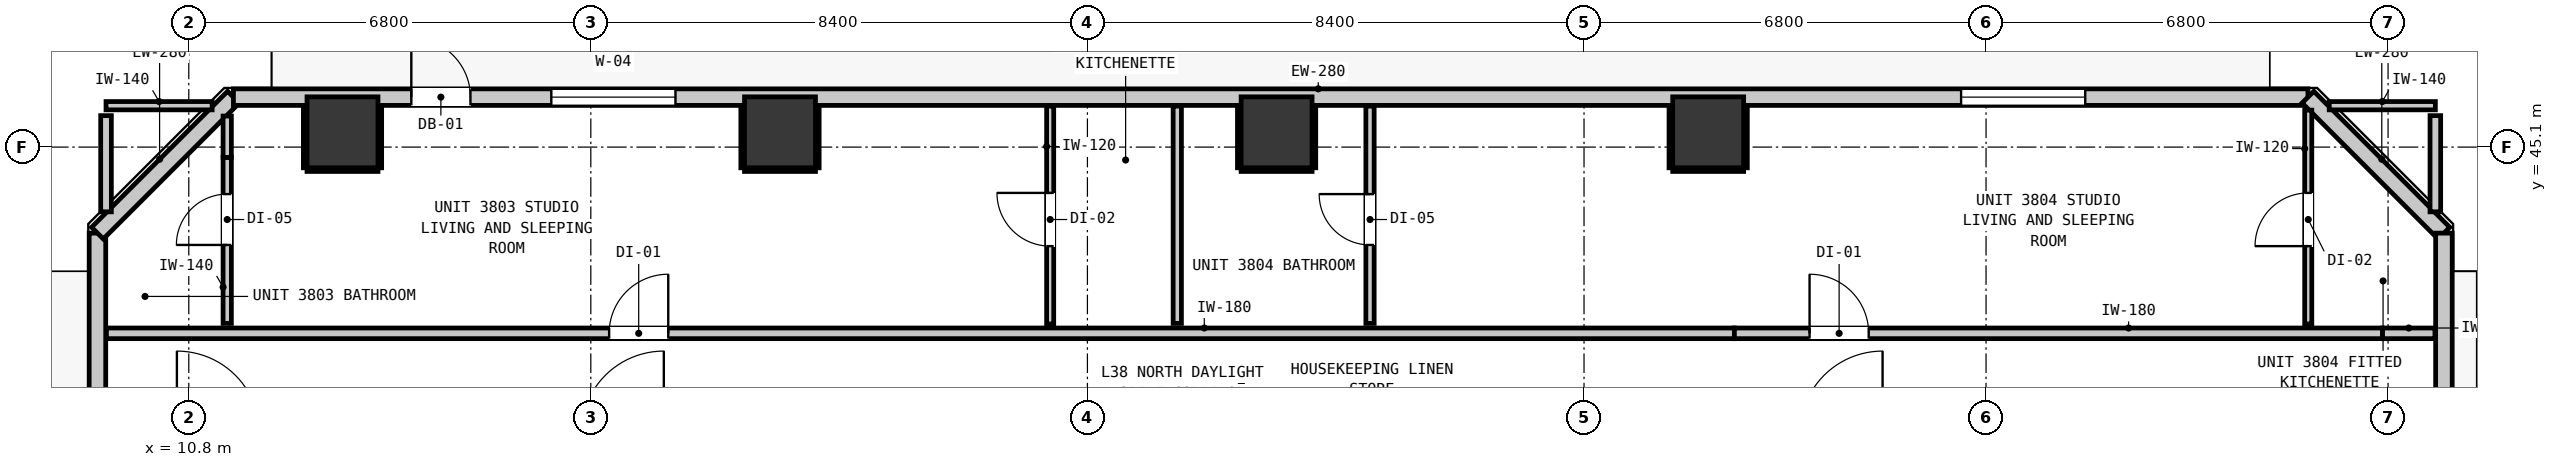
"""IFC4 building model, lengths in metres.
Left out: names, types, materials, properties, quantities, classifications, styles, units other than length and angle.
Written with IfcOpenShell. Run it as: python <this file> out.ifc"""

import sys

from ifc_helpers import new_model, si_unit, direction, frame, frame_2d, origin, origin_2d, place, context, subcontext, project, spatial, rectangle, extrude, element, fill, save


model = new_model("IFC4")
c1 = context("Model", 3, precision=1e-05, world=origin(), true_north=direction((0.0, 1.0)))
c2 = subcontext(c1, "Body", "Model", "MODEL_VIEW")
j1 = project(units=[si_unit("LENGTHUNIT", "METRE"), si_unit("PLANEANGLEUNIT", "RADIAN")], contexts=[c1])
p1 = place(None, origin())
s1 = spatial("IfcSite", under=j1, at=p1, CompositionType="ELEMENT")
p2 = place(p1, origin())
s2 = spatial("IfcBuilding", under=s1, at=p2, CompositionType="ELEMENT")
p3 = place(p2, frame((0.0, 0.0, 132.64)))
s3 = spatial("IfcBuildingStorey", under=s2, at=p3, CompositionType="ELEMENT", Elevation=132.64)
for number, where, z_axis, x_axis in (
    (1, (13.4, 45.35, 0.0), (0.0, 0.0, 1.0), (1.0, 0.0, 0.0)),
    (2, (20.8, 45.35, 0.0), (0.0, 0.0, 1.0), (1.0, 0.0, 0.0)),
    (3, (29.2, 45.35, 0.0), (0.0, 0.0, 1.0), (1.0, 0.0, 0.0)),
    (4, (36.5, 45.35, 0.0), (0.0, 0.0, 1.0), (1.0, 0.0, 0.0)),
):
    element("IfcColumn", number, at=place(p3, frame(where, z_axis=z_axis, x_axis=x_axis)), inside=s3, PredefinedType="COLUMN", context=c2, shape_type="SweptSolid", body=[
        extrude(rectangle(XDim=1.2, YDim=1.2, at=origin_2d()), origin(), (0.0, 0.0, 1.0), 3.32),
    ])
p4 = place(p3, frame((9.255, 11.355, 0.0), z_axis=(0.0, 0.0, 1.0), x_axis=(0.0, 1.0, 0.0)))
e5 = element("IfcWall", 5, at=p4, inside=s3, PredefinedType="STANDARD", context=c2, shape_type="SweptSolid", body=[
    extrude(rectangle(XDim=32.29, YDim=0.28, at=frame_2d((16.145, 0.0))), origin(), (0.0, 0.0, 1.0), 3.08),
])
p5 = place(p4, frame((5.818, 0.0, 0.0)))
e6 = element("IfcOpeningElement", 6, at=p5, cuts=e5, PredefinedType="OPENING", context=c2, shape_type="SweptSolid", body=[
    extrude(rectangle(XDim=1.0, YDim=2.15, at=frame_2d((0.5, 1.075))), frame((0.0, 0.15, 0.0), z_axis=(0.0, -1.0, 0.0), x_axis=(1.0, 0.0, 0.0)), (0.0, 0.0, 1.0), 0.3),
])
p6 = place(p4, frame((0.544, 0.0, 0.85)))
e7 = element("IfcOpeningElement", 7, at=p6, cuts=e5, PredefinedType="OPENING", context=c2, shape_type="SweptSolid", body=[
    extrude(rectangle(XDim=1.05, YDim=1.65, at=frame_2d((0.525, 0.825))), frame((0.0, 0.15, 0.0), z_axis=(0.0, -1.0, 0.0), x_axis=(1.0, 0.0, 0.0)), (0.0, 0.0, 1.0), 0.3),
])
p7 = place(p3, frame((9.255, 43.645, 0.0), z_axis=(0.0, 0.0, 1.0), x_axis=(0.707106781187, 0.707106781187, 0.0)))
e8 = element("IfcWall", 8, at=p7, inside=s3, PredefinedType="STANDARD", context=c2, shape_type="SweptSolid", body=[
    extrude(rectangle(XDim=3.253, YDim=0.28, at=frame_2d((1.626, 0.0))), origin(), (0.0, 0.0, 1.0), 3.08),
])
p8 = place(p3, frame((11.555, 45.945, 0.0), z_axis=(0.0, 0.0, 1.0), x_axis=(1.0, 0.0, 0.0)))
e9 = element("IfcWall", 9, at=p8, inside=s3, PredefinedType="STANDARD", context=c2, shape_type="SweptSolid", body=[
    extrude(rectangle(XDim=35.09, YDim=0.28, at=frame_2d((17.545, 0.0))), origin(), (0.0, 0.0, 1.0), 3.08),
])
p9 = place(p8, frame((3.009, 0.0, 0.0)))
e10 = element("IfcOpeningElement", 10, at=p9, cuts=e9, PredefinedType="OPENING", context=c2, shape_type="SweptSolid", body=[
    extrude(rectangle(XDim=1.0, YDim=2.15, at=frame_2d((0.5, 1.075))), frame((0.0, 0.15, 0.0), z_axis=(0.0, -1.0, 0.0), x_axis=(1.0, 0.0, 0.0)), (0.0, 0.0, 1.0), 0.3),
])
p10 = place(p8, frame((5.377, 0.0, 0.85)))
e11 = element("IfcOpeningElement", 11, at=p10, cuts=e9, PredefinedType="OPENING", context=c2, shape_type="SweptSolid", body=[
    extrude(rectangle(XDim=2.1, YDim=1.9, at=frame_2d((1.05, 0.95))), frame((0.0, 0.15, 0.0), z_axis=(0.0, -1.0, 0.0), x_axis=(1.0, 0.0, 0.0)), (0.0, 0.0, 1.0), 0.3),
])
p11 = place(p8, frame((29.223, 0.0, 0.85)))
e12 = element("IfcOpeningElement", 12, at=p11, cuts=e9, PredefinedType="OPENING", context=c2, shape_type="SweptSolid", body=[
    extrude(rectangle(XDim=2.1, YDim=1.9, at=frame_2d((1.05, 0.95))), frame((0.0, 0.15, 0.0), z_axis=(0.0, -1.0, 0.0), x_axis=(1.0, 0.0, 0.0)), (0.0, 0.0, 1.0), 0.3),
])
p12 = place(p3, frame((46.645, 45.945, 0.0), z_axis=(0.0, 0.0, 1.0), x_axis=(0.707106781187, -0.707106781187, 0.0)))
e13 = element("IfcWall", 13, at=p12, inside=s3, PredefinedType="STANDARD", context=c2, shape_type="SweptSolid", body=[
    extrude(rectangle(XDim=3.253, YDim=0.28, at=frame_2d((1.626, 0.0))), origin(), (0.0, 0.0, 1.0), 3.08),
])
p13 = place(p3, frame((48.945, 43.645, 0.0), z_axis=(0.0, 0.0, 1.0), x_axis=(0.0, -1.0, 0.0)))
e14 = element("IfcWall", 14, at=p13, inside=s3, PredefinedType="STANDARD", context=c2, shape_type="SweptSolid", body=[
    extrude(rectangle(XDim=32.29, YDim=0.28, at=frame_2d((16.145, 0.0))), origin(), (0.0, 0.0, 1.0), 3.08),
])
p14 = place(p13, frame((5.467, 0.0, 0.0)))
e15 = element("IfcOpeningElement", 15, at=p14, cuts=e14, PredefinedType="OPENING", context=c2, shape_type="SweptSolid", body=[
    extrude(rectangle(XDim=1.0, YDim=2.15, at=frame_2d((0.5, 1.075))), frame((0.0, 0.15, 0.0), z_axis=(0.0, -1.0, 0.0), x_axis=(1.0, 0.0, 0.0)), (0.0, 0.0, 1.0), 0.3),
])
p15 = place(p13, frame((30.696, 0.0, 0.85)))
e16 = element("IfcOpeningElement", 16, at=p15, cuts=e14, PredefinedType="OPENING", context=c2, shape_type="SweptSolid", body=[
    extrude(rectangle(XDim=1.05, YDim=1.65, at=frame_2d((0.525, 0.825))), frame((0.0, 0.15, 0.0), z_axis=(0.0, -1.0, 0.0), x_axis=(1.0, 0.0, 0.0)), (0.0, 0.0, 1.0), 0.3),
])
p16 = place(p13, frame((14.611, 0.0, 0.85)))
e17 = element("IfcOpeningElement", 17, at=p16, cuts=e14, PredefinedType="OPENING", context=c2, shape_type="SweptSolid", body=[
    extrude(rectangle(XDim=2.1, YDim=1.9, at=frame_2d((1.05, 0.95))), frame((0.0, 0.15, 0.0), z_axis=(0.0, -1.0, 0.0), x_axis=(1.0, 0.0, 0.0)), (0.0, 0.0, 1.0), 0.3),
])
p17 = place(p13, frame((7.106, 0.0, 0.85)))
e18 = element("IfcOpeningElement", 18, at=p17, cuts=e14, PredefinedType="OPENING", context=c2, shape_type="SweptSolid", body=[
    extrude(rectangle(XDim=1.05, YDim=1.65, at=frame_2d((0.525, 0.825))), frame((0.0, 0.15, 0.0), z_axis=(0.0, -1.0, 0.0), x_axis=(1.0, 0.0, 0.0)), (0.0, 0.0, 1.0), 0.3),
])
p18 = place(p3, frame((9.407, 41.95, 0.0), z_axis=(0.0, 0.0, 1.0), x_axis=(1.0, 0.0, 0.0)))
e19 = element("IfcWall", 19, at=p18, inside=s3, PredefinedType="PARTITIONING", context=c2, shape_type="SweptSolid", body=[
    extrude(rectangle(XDim=27.536, YDim=0.18, at=frame_2d((13.768, 0.0))), origin(), (0.0, 0.0, 1.0), 3.08),
])
p19 = place(p18, frame((8.503, 0.0, 0.0)))
e20 = element("IfcOpeningElement", 20, at=p19, cuts=e19, PredefinedType="OPENING", context=c2, shape_type="SweptSolid", body=[
    extrude(rectangle(XDim=1.0, YDim=2.15, at=frame_2d((0.5, 1.075))), frame((0.0, 0.1, 0.0), z_axis=(0.0, -1.0, 0.0), x_axis=(1.0, 0.0, 0.0)), (0.0, 0.0, 1.0), 0.2),
])
p20 = place(p3, frame((36.943, 41.95, 0.0), z_axis=(0.0, 0.0, 1.0), x_axis=(1.0, 0.0, 0.0)))
e21 = element("IfcWall", 21, at=p20, inside=s3, PredefinedType="PARTITIONING", context=c2, shape_type="SweptSolid", body=[
    extrude(rectangle(XDim=10.964, YDim=0.18, at=frame_2d((5.482, 0.0))), origin(), (0.0, 0.0, 1.0), 2.565),
])
p21 = place(p20, frame((1.272, 0.0, 0.0)))
e22 = element("IfcOpeningElement", 22, at=p21, cuts=e21, PredefinedType="OPENING", context=c2, shape_type="SweptSolid", body=[
    extrude(rectangle(XDim=1.0, YDim=2.15, at=frame_2d((0.5, 1.075))), frame((0.0, 0.1, 0.0), z_axis=(0.0, -1.0, 0.0), x_axis=(1.0, 0.0, 0.0)), (0.0, 0.0, 1.0), 0.2),
])
p22 = place(p3, frame((47.907, 41.95, 0.0), z_axis=(0.0, 0.0, 1.0), x_axis=(1.0, 0.0, 0.0)))
e23 = element("IfcWall", 23, at=p22, inside=s3, PredefinedType="PARTITIONING", context=c2, shape_type="SweptSolid", body=[
    extrude(rectangle(XDim=0.886, YDim=0.18, at=frame_2d((0.443, 0.0))), origin(), (0.0, 0.0, 1.0), 3.08),
])
for number, where, z_axis, x_axis in (
    (24, (9.4, 45.8, 0.0), (0.0, 0.0, 1.0), (1.0, 0.0, 0.0)),
    (25, (47.005, 45.8, 0.0), (0.0, 0.0, 1.0), (1.0, 0.0, 0.0)),
):
    element("IfcWall", number, at=place(p3, frame(where, z_axis=z_axis, x_axis=x_axis)), inside=s3, PredefinedType="PARTITIONING", context=c2, shape_type="SweptSolid", body=[
        extrude(rectangle(XDim=1.795, YDim=0.14, at=frame_2d((0.897, 0.0))), origin(), (0.0, 0.0, 1.0), 3.08),
    ])
for number, where, z_axis, x_axis in (
    (26, (9.4, 44.005, 0.0), (0.0, 0.0, 1.0), (0.0, 1.0, 0.0)),
    (27, (48.8, 44.005, 0.0), (0.0, 0.0, 1.0), (0.0, 1.0, 0.0)),
):
    element("IfcWall", number, at=place(p3, frame(where, z_axis=z_axis, x_axis=x_axis)), inside=s3, PredefinedType="PARTITIONING", context=c2, shape_type="SweptSolid", body=[
        extrude(rectangle(XDim=1.627, YDim=0.18, at=frame_2d((0.813, 0.0))), origin(), (0.0, 0.0, 1.0), 3.08),
    ])
p23 = place(p3, frame((11.45, 42.118, 0.0), z_axis=(0.0, 0.0, 1.0), x_axis=(0.0, 1.0, 0.0)))
e28 = element("IfcWall", 28, at=p23, inside=s3, PredefinedType="PARTITIONING", context=c2, shape_type="SweptSolid", body=[
    extrude(rectangle(XDim=2.808, YDim=0.14, at=frame_2d((1.404, 0.0))), origin(), (0.0, 0.0, 1.0), 2.565),
])
p24 = place(p23, frame((1.327, 0.0, 0.0)))
e29 = element("IfcOpeningElement", 29, at=p24, cuts=e28, PredefinedType="OPENING", context=c2, shape_type="SweptSolid", body=[
    extrude(rectangle(XDim=0.86, YDim=2.02, at=frame_2d((0.43, 1.01))), frame((0.0, 0.08, 0.0), z_axis=(0.0, -1.0, 0.0), x_axis=(1.0, 0.0, 0.0)), (0.0, 0.0, 1.0), 0.16),
])
p25 = place(p3, frame((11.45, 44.926, 0.0), z_axis=(0.0, 0.0, 1.0), x_axis=(0.0, 1.0, 0.0)))
e30 = element("IfcWall", 30, at=p25, inside=s3, PredefinedType="PARTITIONING", context=c2, shape_type="SweptSolid", body=[
    extrude(rectangle(XDim=0.699, YDim=0.14, at=frame_2d((0.35, 0.0))), origin(), (0.0, 0.0, 1.0), 3.08),
])
p26 = place(p3, frame((27.52, 42.118, 0.0), z_axis=(0.0, 0.0, 1.0), x_axis=(0.0, 1.0, 0.0)))
e31 = element("IfcWall", 31, at=p26, inside=s3, PredefinedType="PARTITIONING", context=c2, shape_type="SweptSolid", body=[
    extrude(rectangle(XDim=3.675, YDim=0.14, at=frame_2d((1.837, 0.0))), origin(), (0.0, 0.0, 1.0), 3.08),
])
p27 = place(p3, frame((30.78, 42.118, 0.0), z_axis=(0.0, 0.0, 1.0), x_axis=(0.0, 1.0, 0.0)))
e32 = element("IfcWall", 32, at=p27, inside=s3, PredefinedType="PARTITIONING", context=c2, shape_type="SweptSolid", body=[
    extrude(rectangle(XDim=3.675, YDim=0.14, at=frame_2d((1.837, 0.0))), origin(), (0.0, 0.0, 1.0), 3.08),
])
p28 = place(p27, frame((1.327, 0.0, 0.0)))
e33 = element("IfcOpeningElement", 33, at=p28, cuts=e32, PredefinedType="OPENING", context=c2, shape_type="SweptSolid", body=[
    extrude(rectangle(XDim=0.86, YDim=2.02, at=frame_2d((0.43, 1.01))), frame((0.0, 0.08, 0.0), z_axis=(0.0, -1.0, 0.0), x_axis=(1.0, 0.0, 0.0)), (0.0, 0.0, 1.0), 0.16),
])
p29 = place(p3, frame((25.37, 42.108, 0.0), z_axis=(0.0, 0.0, 1.0), x_axis=(0.0, 1.0, 0.0)))
e34 = element("IfcWall", 34, at=p29, inside=s3, PredefinedType="PARTITIONING", context=c2, shape_type="SweptSolid", body=[
    extrude(rectangle(XDim=3.685, YDim=0.12, at=frame_2d((1.843, 0.0))), origin(), (0.0, 0.0, 1.0), 3.08),
])
p30 = place(p29, frame((1.317, 0.0, 0.0)))
e35 = element("IfcOpeningElement", 35, at=p30, cuts=e34, PredefinedType="OPENING", context=c2, shape_type="SweptSolid", body=[
    extrude(rectangle(XDim=0.9, YDim=2.1, at=frame_2d((0.45, 1.05))), frame((0.0, 0.07, 0.0), z_axis=(0.0, -1.0, 0.0), x_axis=(1.0, 0.0, 0.0)), (0.0, 0.0, 1.0), 0.14),
])
p31 = place(p3, frame((46.65, 42.108, 0.0), z_axis=(0.0, 0.0, 1.0), x_axis=(0.0, 1.0, 0.0)))
e36 = element("IfcWall", 36, at=p31, inside=s3, PredefinedType="PARTITIONING", context=c2, shape_type="SweptSolid", body=[
    extrude(rectangle(XDim=3.617, YDim=0.12, at=frame_2d((1.809, 0.0))), origin(), (0.0, 0.0, 1.0), 3.08),
])
p32 = place(p31, frame((1.317, 0.0, 0.0)))
e37 = element("IfcOpeningElement", 37, at=p32, cuts=e36, PredefinedType="OPENING", context=c2, shape_type="SweptSolid", body=[
    extrude(rectangle(XDim=0.9, YDim=2.1, at=frame_2d((0.45, 1.05))), frame((0.0, 0.07, 0.0), z_axis=(0.0, -1.0, 0.0), x_axis=(1.0, 0.0, 0.0)), (0.0, 0.0, 1.0), 0.14),
])
p33 = place(p3, frame((12.8, 44.718, 0.0), z_axis=(0.0, 0.0, 1.0), x_axis=(1.0, 0.0, 0.0)))
e38 = element("IfcWall", 38, at=p33, inside=s3, PredefinedType="PARTITIONING", context=c2, shape_type="SweptSolid", body=[
    extrude(rectangle(XDim=1.2, YDim=0.06, at=frame_2d((0.6, 0.0))), origin(), (0.0, 0.0, 1.0), 1.45),
])
for number, where, z_axis, x_axis in (
    (39, (12.768, 44.75, 0.0), (0.0, 0.0, 1.0), (0.0, 1.0, 0.0)),
    (40, (14.032, 44.75, 0.0), (0.0, 0.0, 1.0), (0.0, 1.0, 0.0)),
):
    element("IfcWall", number, at=place(p3, frame(where, z_axis=z_axis, x_axis=x_axis)), inside=s3, PredefinedType="PARTITIONING", context=c2, shape_type="SweptSolid", body=[
        extrude(rectangle(XDim=1.04, YDim=0.06, at=frame_2d((0.52, 0.0))), origin(), (0.0, 0.0, 1.0), 1.45),
    ])
p34 = place(p3, frame((20.2, 44.718, 0.0), z_axis=(0.0, 0.0, 1.0), x_axis=(1.0, 0.0, 0.0)))
e41 = element("IfcWall", 41, at=p34, inside=s3, PredefinedType="PARTITIONING", context=c2, shape_type="SweptSolid", body=[
    extrude(rectangle(XDim=1.2, YDim=0.06, at=frame_2d((0.6, 0.0))), origin(), (0.0, 0.0, 1.0), 1.45),
])
for number, where, z_axis, x_axis in (
    (42, (20.168, 44.75, 0.0), (0.0, 0.0, 1.0), (0.0, 1.0, 0.0)),
    (43, (21.432, 44.75, 0.0), (0.0, 0.0, 1.0), (0.0, 1.0, 0.0)),
):
    element("IfcWall", number, at=place(p3, frame(where, z_axis=z_axis, x_axis=x_axis)), inside=s3, PredefinedType="PARTITIONING", context=c2, shape_type="SweptSolid", body=[
        extrude(rectangle(XDim=1.04, YDim=0.06, at=frame_2d((0.52, 0.0))), origin(), (0.0, 0.0, 1.0), 1.45),
    ])
p35 = place(p3, frame((28.6, 44.718, 0.0), z_axis=(0.0, 0.0, 1.0), x_axis=(1.0, 0.0, 0.0)))
e44 = element("IfcWall", 44, at=p35, inside=s3, PredefinedType="PARTITIONING", context=c2, shape_type="SweptSolid", body=[
    extrude(rectangle(XDim=1.2, YDim=0.06, at=frame_2d((0.6, 0.0))), origin(), (0.0, 0.0, 1.0), 1.45),
])
for number, where, z_axis, x_axis in (
    (45, (28.568, 44.75, 0.0), (0.0, 0.0, 1.0), (0.0, 1.0, 0.0)),
    (46, (29.832, 44.75, 0.0), (0.0, 0.0, 1.0), (0.0, 1.0, 0.0)),
):
    element("IfcWall", number, at=place(p3, frame(where, z_axis=z_axis, x_axis=x_axis)), inside=s3, PredefinedType="PARTITIONING", context=c2, shape_type="SweptSolid", body=[
        extrude(rectangle(XDim=1.04, YDim=0.06, at=frame_2d((0.52, 0.0))), origin(), (0.0, 0.0, 1.0), 1.45),
    ])
p36 = place(p3, frame((35.9, 44.718, 0.0), z_axis=(0.0, 0.0, 1.0), x_axis=(1.0, 0.0, 0.0)))
e47 = element("IfcWall", 47, at=p36, inside=s3, PredefinedType="PARTITIONING", context=c2, shape_type="SweptSolid", body=[
    extrude(rectangle(XDim=1.2, YDim=0.06, at=frame_2d((0.6, 0.0))), origin(), (0.0, 0.0, 1.0), 1.45),
])
for number, where, z_axis, x_axis in (
    (48, (35.868, 44.75, 0.0), (0.0, 0.0, 1.0), (0.0, 1.0, 0.0)),
    (49, (37.132, 44.75, 0.0), (0.0, 0.0, 1.0), (0.0, 1.0, 0.0)),
):
    element("IfcWall", number, at=place(p3, frame(where, z_axis=z_axis, x_axis=x_axis)), inside=s3, PredefinedType="PARTITIONING", context=c2, shape_type="SweptSolid", body=[
        extrude(rectangle(XDim=1.04, YDim=0.06, at=frame_2d((0.52, 0.0))), origin(), (0.0, 0.0, 1.0), 1.45),
    ])
p37 = place(p9, origin())
e50 = element("IfcDoor", 50, at=p37, inside=s3, OperationType="SINGLE_SWING_LEFT", PredefinedType="DOOR", context=c2, shape_type="SweptSolid", body=[
    extrude(rectangle(XDim=1.0, YDim=2.15, at=frame_2d((0.5, 1.075))), frame((0.0, 0.025, 0.0), z_axis=(0.0, -1.0, 0.0), x_axis=(1.0, 0.0, 0.0)), (0.0, 0.0, 1.0), 0.05),
])
fill(e10, e50)
p38 = place(p10, origin())
e51 = element("IfcWindow", 51, at=p38, inside=s3, PartitioningType="SINGLE_PANEL", PredefinedType="WINDOW", context=c2, shape_type="SweptSolid", body=[
    extrude(rectangle(XDim=2.1, YDim=1.9, at=frame_2d((1.05, 0.95))), frame((0.0, 0.03, 0.0), z_axis=(0.0, -1.0, 0.0), x_axis=(1.0, 0.0, 0.0)), (0.0, 0.0, 1.0), 0.06),
])
fill(e11, e51)
p39 = place(p11, origin())
e52 = element("IfcWindow", 52, at=p39, inside=s3, PartitioningType="SINGLE_PANEL", PredefinedType="WINDOW", context=c2, shape_type="SweptSolid", body=[
    extrude(rectangle(XDim=2.1, YDim=1.9, at=frame_2d((1.05, 0.95))), frame((0.0, 0.03, 0.0), z_axis=(0.0, -1.0, 0.0), x_axis=(1.0, 0.0, 0.0)), (0.0, 0.0, 1.0), 0.06),
])
fill(e12, e52)
p40 = place(p19, origin())
e53 = element("IfcDoor", 53, at=p40, inside=s3, OperationType="SINGLE_SWING_RIGHT", PredefinedType="DOOR", context=c2, shape_type="SweptSolid", body=[
    extrude(rectangle(XDim=1.0, YDim=2.15, at=frame_2d((0.5, 1.075))), frame((0.0, 0.025, 0.0), z_axis=(0.0, -1.0, 0.0), x_axis=(1.0, 0.0, 0.0)), (0.0, 0.0, 1.0), 0.05),
])
fill(e20, e53)
p41 = place(p24, origin())
e54 = element("IfcDoor", 54, at=p41, inside=s3, OperationType="SINGLE_SWING_LEFT", PredefinedType="DOOR", context=c2, shape_type="SweptSolid", body=[
    extrude(rectangle(XDim=0.86, YDim=2.02, at=frame_2d((0.43, 1.01))), frame((0.0, 0.025, 0.0), z_axis=(0.0, -1.0, 0.0), x_axis=(1.0, 0.0, 0.0)), (0.0, 0.0, 1.0), 0.05),
])
fill(e29, e54)
p42 = place(p30, origin())
e55 = element("IfcDoor", 55, at=p42, inside=s3, OperationType="SINGLE_SWING_RIGHT", PredefinedType="DOOR", context=c2, shape_type="SweptSolid", body=[
    extrude(rectangle(XDim=0.9, YDim=2.1, at=frame_2d((0.45, 1.05))), frame((0.0, 0.025, 0.0), z_axis=(0.0, -1.0, 0.0), x_axis=(1.0, 0.0, 0.0)), (0.0, 0.0, 1.0), 0.05),
])
fill(e35, e55)
p43 = place(p21, origin())
e56 = element("IfcDoor", 56, at=p43, inside=s3, OperationType="SINGLE_SWING_LEFT", PredefinedType="DOOR", context=c2, shape_type="SweptSolid", body=[
    extrude(rectangle(XDim=1.0, YDim=2.15, at=frame_2d((0.5, 1.075))), frame((0.0, 0.025, 0.0), z_axis=(0.0, -1.0, 0.0), x_axis=(1.0, 0.0, 0.0)), (0.0, 0.0, 1.0), 0.05),
])
fill(e22, e56)
p44 = place(p28, origin())
e57 = element("IfcDoor", 57, at=p44, inside=s3, OperationType="SINGLE_SWING_RIGHT", PredefinedType="DOOR", context=c2, shape_type="SweptSolid", body=[
    extrude(rectangle(XDim=0.86, YDim=2.02, at=frame_2d((0.43, 1.01))), frame((0.0, 0.025, 0.0), z_axis=(0.0, -1.0, 0.0), x_axis=(1.0, 0.0, 0.0)), (0.0, 0.0, 1.0), 0.05),
])
fill(e33, e57)
p45 = place(p32, origin())
e58 = element("IfcDoor", 58, at=p45, inside=s3, OperationType="SINGLE_SWING_LEFT", PredefinedType="DOOR", context=c2, shape_type="SweptSolid", body=[
    extrude(rectangle(XDim=0.9, YDim=2.1, at=frame_2d((0.45, 1.05))), frame((0.0, 0.025, 0.0), z_axis=(0.0, -1.0, 0.0), x_axis=(1.0, 0.0, 0.0)), (0.0, 0.0, 1.0), 0.05),
])
fill(e37, e58)
save(model, sys.argv[1])
